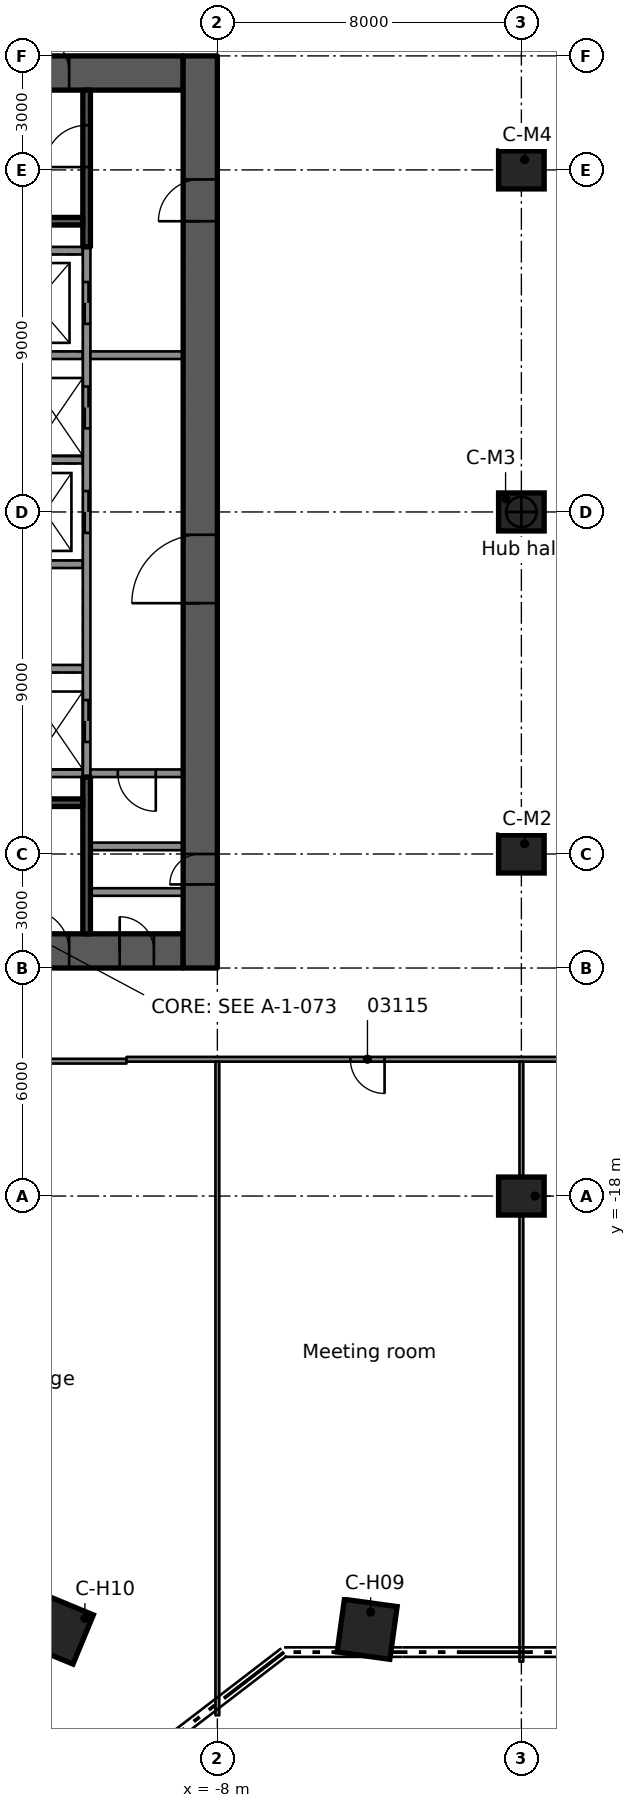
"""IFC4 building model, lengths in metres.
Left out: names, types, materials, properties, quantities, classifications, styles, units other than length and angle.
Written with IfcOpenShell. Run it as: python <this file> out.ifc"""

import sys

from ifc_helpers import new_model, si_unit, direction, frame, frame_2d, origin, origin_2d, place, context, subcontext, project, spatial, rectangle, extrude, element, fill, save


model = new_model("IFC4")
c1 = context("Model", 3, precision=1e-05, world=origin(), true_north=direction((0.0, 1.0)))
c2 = subcontext(c1, "Body", "Model", "MODEL_VIEW")
j1 = project(units=[si_unit("LENGTHUNIT", "METRE"), si_unit("PLANEANGLEUNIT", "RADIAN")], contexts=[c1])
p1 = place(None, origin())
s1 = spatial("IfcSite", under=j1, at=p1, CompositionType="ELEMENT")
p2 = place(p1, origin())
s2 = spatial("IfcBuilding", under=s1, at=p2, CompositionType="ELEMENT")
p3 = place(p2, frame((0.0, 0.0, 15.5)))
s3 = spatial("IfcBuildingStorey", under=s2, at=p3, CompositionType="ELEMENT", Elevation=15.5)
p4 = place(p3, frame((-18.1, 11.55, 0.0), z_axis=(0.0, 0.0, 1.0), x_axis=(1.0, 0.0, 0.0)))
e1 = element("IfcWall", 1, at=p4, inside=s3, PredefinedType="SHEAR", context=c2, shape_type="SweptSolid", body=[
    extrude(rectangle(XDim=9.2, YDim=0.9, at=frame_2d((4.6, 0.0))), origin(), (0.0, 0.0, 1.0), 5.0),
])
p5 = place(p4, frame((5.1, 0.0, 0.0)))
e2 = element("IfcOpeningElement", 2, at=p5, cuts=e1, PredefinedType="OPENING", context=c2, shape_type="SweptSolid", body=[
    extrude(rectangle(XDim=1.1, YDim=2.1, at=frame_2d((0.55, 1.05))), frame((0.0, 0.46, 0.0), z_axis=(0.0, -1.0, 0.0), x_axis=(1.0, 0.0, 0.0)), (0.0, 0.0, 1.0), 0.92),
])
p6 = place(p3, frame((-18.1, -11.55, 0.0), z_axis=(0.0, 0.0, 1.0), x_axis=(1.0, 0.0, 0.0)))
e3 = element("IfcWall", 3, at=p6, inside=s3, PredefinedType="SHEAR", context=c2, shape_type="SweptSolid", body=[
    extrude(rectangle(XDim=9.2, YDim=0.9, at=frame_2d((4.6, 0.0))), origin(), (0.0, 0.0, 1.0), 5.0),
])
p7 = place(p6, frame((5.1, 0.0, 0.0)))
e4 = element("IfcOpeningElement", 4, at=p7, cuts=e3, PredefinedType="OPENING", context=c2, shape_type="SweptSolid", body=[
    extrude(rectangle(XDim=1.1, YDim=2.1, at=frame_2d((0.55, 1.05))), frame((0.0, 0.46, 0.0), z_axis=(0.0, -1.0, 0.0), x_axis=(1.0, 0.0, 0.0)), (0.0, 0.0, 1.0), 0.92),
])
p8 = place(p6, frame((7.53, 0.0, 0.0)))
e5 = element("IfcOpeningElement", 5, at=p8, cuts=e3, PredefinedType="OPENING", context=c2, shape_type="SweptSolid", body=[
    extrude(rectangle(XDim=0.9, YDim=2.1, at=frame_2d((0.45, 1.05))), frame((0.0, 0.46, 0.0), z_axis=(0.0, -1.0, 0.0), x_axis=(1.0, 0.0, 0.0)), (0.0, 0.0, 1.0), 0.92),
])
p9 = place(p3, frame((-8.45, -12.0, 0.0), z_axis=(0.0, 0.0, 1.0), x_axis=(0.0, 1.0, 0.0)))
e6 = element("IfcWall", 6, at=p9, inside=s3, PredefinedType="SHEAR", context=c2, shape_type="SweptSolid", body=[
    extrude(rectangle(XDim=24.0, YDim=0.9, at=frame_2d((12.0, 0.0))), origin(), (0.0, 0.0, 1.0), 5.0),
])
p10 = place(p9, frame((9.6, 0.0, 0.0)))
e7 = element("IfcOpeningElement", 7, at=p10, cuts=e6, PredefinedType="OPENING", context=c2, shape_type="SweptSolid", body=[
    extrude(rectangle(XDim=1.8, YDim=2.1, at=frame_2d((0.9, 1.05))), frame((0.0, 0.46, 0.0), z_axis=(0.0, -1.0, 0.0), x_axis=(1.0, 0.0, 0.0)), (0.0, 0.0, 1.0), 0.92),
])
p11 = place(p9, frame((19.65, 0.0, 0.0)))
e8 = element("IfcOpeningElement", 8, at=p11, cuts=e6, PredefinedType="OPENING", context=c2, shape_type="SweptSolid", body=[
    extrude(rectangle(XDim=1.1, YDim=2.1, at=frame_2d((0.55, 1.05))), frame((0.0, 0.46, 0.0), z_axis=(0.0, -1.0, 0.0), x_axis=(1.0, 0.0, 0.0)), (0.0, 0.0, 1.0), 0.92),
])
p12 = place(p9, frame((2.2, 0.0, 0.0)))
e9 = element("IfcOpeningElement", 9, at=p12, cuts=e6, PredefinedType="OPENING", context=c2, shape_type="SweptSolid", body=[
    extrude(rectangle(XDim=0.8, YDim=2.1, at=frame_2d((0.4, 1.05))), frame((0.0, 0.46, 0.0), z_axis=(0.0, -1.0, 0.0), x_axis=(1.0, 0.0, 0.0)), (0.0, 0.0, 1.0), 0.92),
])
for number, where, z_axis, x_axis in (
    (10, (-4.059, -29.4, 0.0), (0.0, 0.0, 1.0), (-0.137, -0.991, 0.0)),
    (11, (-12.178, -29.4, 0.0), (0.0, 0.0, 1.0), (-0.383, -0.924, 0.0)),
):
    element("IfcColumn", number, at=place(p3, frame(where, z_axis=z_axis, x_axis=x_axis)), inside=s3, PredefinedType="COLUMN", context=c2, shape_type="SweptSolid", body=[
        extrude(rectangle(XDim=1.4, YDim=1.4, at=origin_2d()), origin(), (0.0, 0.0, 1.0), 5.0),
    ])
for number, where, z_axis, x_axis in (
    (12, (0.0, -18.0, 0.0), (0.0, 0.0, 1.0), (1.0, 0.0, 0.0)),
    (13, (0.0, -9.0, 0.0), (0.0, 0.0, 1.0), (1.0, 0.0, 0.0)),
    (14, (0.0, 0.0, 0.0), (0.0, 0.0, 1.0), (1.0, 0.0, 0.0)),
    (15, (0.0, 9.0, 0.0), (0.0, 0.0, 1.0), (1.0, 0.0, 0.0)),
):
    element("IfcColumn", number, at=place(p3, frame(where, z_axis=z_axis, x_axis=x_axis)), inside=s3, PredefinedType="COLUMN", context=c2, shape_type="SweptSolid", body=[
        extrude(rectangle(XDim=1.2, YDim=1.0, at=origin_2d()), origin(), (0.0, 0.0, 1.0), 5.0),
    ])
for number, where, z_axis, x_axis in (
    (16, (-11.54, 6.875, 0.0), (0.0, 0.0, 1.0), (-1.0, 0.0, 0.0)),
    (17, (-11.54, -6.875, 0.0), (0.0, 0.0, 1.0), (-1.0, 0.0, 0.0)),
):
    element("IfcWall", number, at=place(p3, frame(where, z_axis=z_axis, x_axis=x_axis)), inside=s3, PredefinedType="SOLIDWALL", context=c2, shape_type="SweptSolid", body=[
        extrude(rectangle(XDim=6.56, YDim=0.2, at=frame_2d((3.28, 0.0))), origin(), (0.0, 0.0, 1.0), 4.59),
    ])
p13 = place(p3, frame((-11.54, -4.125, 0.0), z_axis=(0.0, 0.0, 1.0), x_axis=(-1.0, 0.0, 0.0)))
e18 = element("IfcWall", 18, at=p13, inside=s3, PredefinedType="SOLIDWALL", context=c2, shape_type="SweptSolid", body=[
    extrude(rectangle(XDim=4.7, YDim=0.2, at=frame_2d((2.35, 0.0))), origin(), (0.0, 0.0, 1.0), 4.59),
])
for number, where, z_axis, x_axis in (
    (19, (-11.54, -1.375, 0.0), (0.0, 0.0, 1.0), (-1.0, 0.0, 0.0)),
    (20, (-11.54, 1.375, 0.0), (0.0, 0.0, 1.0), (-1.0, 0.0, 0.0)),
):
    element("IfcWall", number, at=place(p3, frame(where, z_axis=z_axis, x_axis=x_axis)), inside=s3, PredefinedType="SOLIDWALL", context=c2, shape_type="SweptSolid", body=[
        extrude(rectangle(XDim=4.2, YDim=0.2, at=frame_2d((2.1, 0.0))), origin(), (0.0, 0.0, 1.0), 4.59),
    ])
p14 = place(p3, frame((-11.54, 4.125, 0.0), z_axis=(0.0, 0.0, 1.0), x_axis=(-1.0, 0.0, 0.0)))
e21 = element("IfcWall", 21, at=p14, inside=s3, PredefinedType="SOLIDWALL", context=c2, shape_type="SweptSolid", body=[
    extrude(rectangle(XDim=4.7, YDim=0.2, at=frame_2d((2.35, 0.0))), origin(), (0.0, 0.0, 1.0), 4.59),
])
p15 = place(p3, frame((-11.44, -6.975, 0.0), z_axis=(0.0, 0.0, 1.0), x_axis=(0.0, 1.0, 0.0)))
e22 = element("IfcWall", 22, at=p15, inside=s3, PredefinedType="SOLIDWALL", context=c2, shape_type="SweptSolid", body=[
    extrude(rectangle(XDim=13.95, YDim=0.2, at=frame_2d((6.975, 0.0))), origin(), (0.0, 0.0, 1.0), 4.59),
])
p16 = place(p15, frame((0.925, 0.0, 0.0)))
e23 = element("IfcOpeningElement", 23, at=p16, cuts=e22, PredefinedType="OPENING", context=c2, shape_type="SweptSolid", body=[
    extrude(rectangle(XDim=1.1, YDim=2.1, at=frame_2d((0.55, 1.05))), frame((0.0, 0.11, 0.0), z_axis=(0.0, -1.0, 0.0), x_axis=(1.0, 0.0, 0.0)), (0.0, 0.0, 1.0), 0.22),
])
p17 = place(p15, frame((6.425, 0.0, 0.0)))
e24 = element("IfcOpeningElement", 24, at=p17, cuts=e22, PredefinedType="OPENING", context=c2, shape_type="SweptSolid", body=[
    extrude(rectangle(XDim=1.1, YDim=2.1, at=frame_2d((0.55, 1.05))), frame((0.0, 0.11, 0.0), z_axis=(0.0, -1.0, 0.0), x_axis=(1.0, 0.0, 0.0)), (0.0, 0.0, 1.0), 0.22),
])
p18 = place(p15, frame((9.175, 0.0, 0.0)))
e25 = element("IfcOpeningElement", 25, at=p18, cuts=e22, PredefinedType="OPENING", context=c2, shape_type="SweptSolid", body=[
    extrude(rectangle(XDim=1.1, YDim=2.1, at=frame_2d((0.55, 1.05))), frame((0.0, 0.11, 0.0), z_axis=(0.0, -1.0, 0.0), x_axis=(1.0, 0.0, 0.0)), (0.0, 0.0, 1.0), 0.22),
])
p19 = place(p15, frame((11.925, 0.0, 0.0)))
e26 = element("IfcOpeningElement", 26, at=p19, cuts=e22, PredefinedType="OPENING", context=c2, shape_type="SweptSolid", body=[
    extrude(rectangle(XDim=1.1, YDim=2.1, at=frame_2d((0.55, 1.05))), frame((0.0, 0.11, 0.0), z_axis=(0.0, -1.0, 0.0), x_axis=(1.0, 0.0, 0.0)), (0.0, 0.0, 1.0), 0.22),
])
p20 = place(p3, frame((-11.44, 6.975, 0.0), z_axis=(0.0, 0.0, 1.0), x_axis=(0.0, 1.0, 0.0)))
e27 = element("IfcWall", 27, at=p20, inside=s3, PredefinedType="SOLIDWALL", context=c2, shape_type="SweptSolid", body=[
    extrude(rectangle(XDim=4.125, YDim=0.2, at=frame_2d((2.062, 0.0))), origin(), (0.0, 0.0, 1.0), 4.59),
])
p21 = place(p20, frame((2.1, 0.0, 0.0)))
e28 = element("IfcOpeningElement", 28, at=p21, cuts=e27, PredefinedType="OPENING", context=c2, shape_type="SweptSolid", body=[
    extrude(rectangle(XDim=1.1, YDim=2.1, at=frame_2d((0.55, 1.05))), frame((0.0, 0.11, 0.0), z_axis=(0.0, -1.0, 0.0), x_axis=(1.0, 0.0, 0.0)), (0.0, 0.0, 1.0), 0.22),
])
p22 = place(p3, frame((-11.54, 7.65, 0.0), z_axis=(0.0, 0.0, 1.0), x_axis=(-1.0, 0.0, 0.0)))
e29 = element("IfcWall", 29, at=p22, inside=s3, PredefinedType="SOLIDWALL", context=c2, shape_type="SweptSolid", body=[
    extrude(rectangle(XDim=6.56, YDim=0.2, at=frame_2d((3.28, 0.0))), origin(), (0.0, 0.0, 1.0), 4.59),
])
p23 = place(p3, frame((-11.44, -11.1, 0.0), z_axis=(0.0, 0.0, 1.0), x_axis=(0.0, 1.0, 0.0)))
e30 = element("IfcWall", 30, at=p23, inside=s3, PredefinedType="SOLIDWALL", context=c2, shape_type="SweptSolid", body=[
    extrude(rectangle(XDim=4.125, YDim=0.2, at=frame_2d((2.062, 0.0))), origin(), (0.0, 0.0, 1.0), 4.59),
])
p24 = place(p3, frame((-11.54, -7.65, 0.0), z_axis=(0.0, 0.0, 1.0), x_axis=(-1.0, 0.0, 0.0)))
e31 = element("IfcWall", 31, at=p24, inside=s3, PredefinedType="SOLIDWALL", context=c2, shape_type="SweptSolid", body=[
    extrude(rectangle(XDim=6.56, YDim=0.2, at=frame_2d((3.28, 0.0))), origin(), (0.0, 0.0, 1.0), 4.59),
])
p25 = place(p3, frame((-8.9, 4.125, 0.0), z_axis=(0.0, 0.0, 1.0), x_axis=(-1.0, 0.0, 0.0)))
e32 = element("IfcWall", 32, at=p25, inside=s3, PredefinedType="PARTITIONING", context=c2, shape_type="SweptSolid", body=[
    extrude(rectangle(XDim=2.44, YDim=0.2, at=frame_2d((1.22, 0.0))), origin(), (0.0, 0.0, 1.0), 4.59),
])
p26 = place(p3, frame((-8.9, -6.875, 0.0), z_axis=(0.0, 0.0, 1.0), x_axis=(-1.0, 0.0, 0.0)))
e33 = element("IfcWall", 33, at=p26, inside=s3, PredefinedType="PARTITIONING", context=c2, shape_type="SweptSolid", body=[
    extrude(rectangle(XDim=2.44, YDim=0.2, at=frame_2d((1.22, 0.0))), origin(), (0.0, 0.0, 1.0), 4.59),
])
p27 = place(p26, frame((0.72, 0.0, 0.0)))
e34 = element("IfcOpeningElement", 34, at=p27, cuts=e33, PredefinedType="OPENING", context=c2, shape_type="SweptSolid", body=[
    extrude(rectangle(XDim=1.0, YDim=2.1, at=frame_2d((0.5, 1.05))), frame((0.0, 0.11, 0.0), z_axis=(0.0, -1.0, 0.0), x_axis=(1.0, 0.0, 0.0)), (0.0, 0.0, 1.0), 0.22),
])
for number, where, z_axis, x_axis in (
    (35, (-8.9, -10.0, 0.0), (0.0, 0.0, 1.0), (-1.0, 0.0, 0.0)),
    (36, (-8.9, -8.8, 0.0), (0.0, 0.0, 1.0), (-1.0, 0.0, 0.0)),
):
    element("IfcWall", number, at=place(p3, frame(where, z_axis=z_axis, x_axis=x_axis)), inside=s3, PredefinedType="PARTITIONING", context=c2, shape_type="SweptSolid", body=[
        extrude(rectangle(XDim=2.44, YDim=0.2, at=frame_2d((1.22, 0.0))), origin(), (0.0, 0.0, 1.0), 4.59),
    ])
p28 = place(p3, frame((-20.63, -23.535, 0.0), z_axis=(0.0, 0.0, 1.0), x_axis=(0.608785675767, -0.79333473451, 0.0)))
e37 = element("IfcWall", 37, at=p28, inside=s3, PredefinedType="PARTITIONING", context=c2, shape_type="SweptSolid", body=[
    extrude(rectangle(XDim=14.138, YDim=0.1, at=frame_2d((7.069, 0.0))), origin(), (0.0, 0.0, 1.0), 4.58),
])
p29 = place(p3, frame((-10.391, -14.451, 0.0), z_axis=(0.0, 0.0, 1.0), x_axis=(-1.0, 0.0, 0.0)))
e38 = element("IfcWall", 38, at=p29, inside=s3, PredefinedType="PARTITIONING", context=c2, shape_type="SweptSolid", body=[
    extrude(rectangle(XDim=7.871, YDim=0.125, at=frame_2d((3.936, 0.0))), origin(), (0.0, 0.0, 1.0), 4.58),
])
p30 = place(p29, frame((3.1, 0.0, 0.0)))
e39 = element("IfcOpeningElement", 39, at=p30, cuts=e38, PredefinedType="OPENING", context=c2, shape_type="SweptSolid", body=[
    extrude(rectangle(XDim=1.8, YDim=2.1, at=frame_2d((0.9, 1.05))), frame((0.0, 0.073, 0.0), z_axis=(0.0, -1.0, 0.0), x_axis=(1.0, 0.0, 0.0)), (0.0, 0.0, 1.0), 0.145),
])
p31 = place(p3, frame((10.391, -14.401, 0.0), z_axis=(0.0, 0.0, 1.0), x_axis=(-1.0, 0.0, 0.0)))
e40 = element("IfcWall", 40, at=p31, inside=s3, PredefinedType="PARTITIONING", context=c2, shape_type="SweptSolid", body=[
    extrude(rectangle(XDim=20.781, YDim=0.125, at=frame_2d((10.391, 0.0))), origin(), (0.0, 0.0, 1.0), 4.58),
])
p32 = place(p31, frame((13.991, 0.0, 0.0)))
e41 = element("IfcOpeningElement", 41, at=p32, cuts=e40, PredefinedType="OPENING", context=c2, shape_type="SweptSolid", body=[
    extrude(rectangle(XDim=0.9, YDim=2.1, at=frame_2d((0.45, 1.05))), frame((0.0, 0.073, 0.0), z_axis=(0.0, -1.0, 0.0), x_axis=(1.0, 0.0, 0.0)), (0.0, 0.0, 1.0), 0.145),
])
p33 = place(p31, frame((5.991, 0.0, 0.0)))
e42 = element("IfcOpeningElement", 42, at=p33, cuts=e40, PredefinedType="OPENING", context=c2, shape_type="SweptSolid", body=[
    extrude(rectangle(XDim=0.9, YDim=2.1, at=frame_2d((0.45, 1.05))), frame((0.0, 0.073, 0.0), z_axis=(0.0, -1.0, 0.0), x_axis=(1.0, 0.0, 0.0)), (0.0, 0.0, 1.0), 0.145),
])
p34 = place(p3, frame((0.0, -30.25, 0.0), z_axis=(0.0, 0.0, 1.0), x_axis=(0.0, 1.0, 0.0)))
e43 = element("IfcWall", 43, at=p34, inside=s3, PredefinedType="PARTITIONING", context=c2, shape_type="SweptSolid", body=[
    extrude(rectangle(XDim=15.787, YDim=0.1, at=frame_2d((7.894, 0.0))), origin(), (0.0, 0.0, 1.0), 4.58),
])
p35 = place(p3, frame((-8.0, -31.663, 0.0), z_axis=(0.0, 0.0, 1.0), x_axis=(0.0, 1.0, 0.0)))
e44 = element("IfcWall", 44, at=p35, inside=s3, PredefinedType="PARTITIONING", context=c2, shape_type="SweptSolid", body=[
    extrude(rectangle(XDim=17.2, YDim=0.1, at=frame_2d((8.6, 0.0))), origin(), (0.0, 0.0, 1.0), 4.58),
])
p36 = place(p16, origin())
e45 = element("IfcDoor", 45, at=p36, inside=s3, OperationType="DOUBLE_DOOR_SLIDING", PredefinedType="DOOR", context=c2, shape_type="SweptSolid", body=[
    extrude(rectangle(XDim=1.1, YDim=2.1, at=frame_2d((0.55, 1.05))), frame((0.0, 0.025, 0.0), z_axis=(0.0, -1.0, 0.0), x_axis=(1.0, 0.0, 0.0)), (0.0, 0.0, 1.0), 0.05),
])
fill(e23, e45)
p37 = place(p17, origin())
e46 = element("IfcDoor", 46, at=p37, inside=s3, OperationType="DOUBLE_DOOR_SLIDING", PredefinedType="DOOR", context=c2, shape_type="SweptSolid", body=[
    extrude(rectangle(XDim=1.1, YDim=2.1, at=frame_2d((0.55, 1.05))), frame((0.0, 0.025, 0.0), z_axis=(0.0, -1.0, 0.0), x_axis=(1.0, 0.0, 0.0)), (0.0, 0.0, 1.0), 0.05),
])
fill(e24, e46)
p38 = place(p18, origin())
e47 = element("IfcDoor", 47, at=p38, inside=s3, OperationType="DOUBLE_DOOR_SLIDING", PredefinedType="DOOR", context=c2, shape_type="SweptSolid", body=[
    extrude(rectangle(XDim=1.1, YDim=2.1, at=frame_2d((0.55, 1.05))), frame((0.0, 0.025, 0.0), z_axis=(0.0, -1.0, 0.0), x_axis=(1.0, 0.0, 0.0)), (0.0, 0.0, 1.0), 0.05),
])
fill(e25, e47)
p39 = place(p19, origin())
e48 = element("IfcDoor", 48, at=p39, inside=s3, OperationType="DOUBLE_DOOR_SLIDING", PredefinedType="DOOR", context=c2, shape_type="SweptSolid", body=[
    extrude(rectangle(XDim=1.1, YDim=2.1, at=frame_2d((0.55, 1.05))), frame((0.0, 0.025, 0.0), z_axis=(0.0, -1.0, 0.0), x_axis=(1.0, 0.0, 0.0)), (0.0, 0.0, 1.0), 0.05),
])
fill(e26, e48)
p40 = place(p10, origin())
e49 = element("IfcDoor", 49, at=p40, inside=s3, OperationType="SINGLE_SWING_LEFT", PredefinedType="DOOR", context=c2, shape_type="SweptSolid", body=[
    extrude(rectangle(XDim=1.8, YDim=2.1, at=frame_2d((0.9, 1.05))), frame((0.0, 0.025, 0.0), z_axis=(0.0, -1.0, 0.0), x_axis=(1.0, 0.0, 0.0)), (0.0, 0.0, 1.0), 0.05),
])
fill(e7, e49)
p41 = place(p11, origin())
e50 = element("IfcDoor", 50, at=p41, inside=s3, OperationType="SINGLE_SWING_RIGHT", PredefinedType="DOOR", context=c2, shape_type="SweptSolid", body=[
    extrude(rectangle(XDim=1.1, YDim=2.1, at=frame_2d((0.55, 1.05))), frame((0.0, 0.025, 0.0), z_axis=(0.0, -1.0, 0.0), x_axis=(1.0, 0.0, 0.0)), (0.0, 0.0, 1.0), 0.05),
])
fill(e8, e50)
p42 = place(p5, origin())
e51 = element("IfcDoor", 51, at=p42, inside=s3, OperationType="SINGLE_SWING_RIGHT", PredefinedType="DOOR", context=c2, shape_type="SweptSolid", body=[
    extrude(rectangle(XDim=1.1, YDim=2.1, at=frame_2d((0.55, 1.05))), frame((0.0, 0.025, 0.0), z_axis=(0.0, -1.0, 0.0), x_axis=(1.0, 0.0, 0.0)), (0.0, 0.0, 1.0), 0.05),
])
fill(e2, e51)
p43 = place(p7, origin())
e52 = element("IfcDoor", 52, at=p43, inside=s3, OperationType="SINGLE_SWING_RIGHT", PredefinedType="DOOR", context=c2, shape_type="SweptSolid", body=[
    extrude(rectangle(XDim=1.1, YDim=2.1, at=frame_2d((0.55, 1.05))), frame((0.0, 0.025, 0.0), z_axis=(0.0, -1.0, 0.0), x_axis=(1.0, 0.0, 0.0)), (0.0, 0.0, 1.0), 0.05),
])
fill(e4, e52)
p44 = place(p21, origin())
e53 = element("IfcDoor", 53, at=p44, inside=s3, OperationType="SINGLE_SWING_RIGHT", PredefinedType="DOOR", context=c2, shape_type="SweptSolid", body=[
    extrude(rectangle(XDim=1.1, YDim=2.1, at=frame_2d((0.55, 1.05))), frame((0.0, 0.025, 0.0), z_axis=(0.0, -1.0, 0.0), x_axis=(1.0, 0.0, 0.0)), (0.0, 0.0, 1.0), 0.05),
])
fill(e28, e53)
p45 = place(p8, origin())
e54 = element("IfcDoor", 54, at=p45, inside=s3, OperationType="SINGLE_SWING_RIGHT", PredefinedType="DOOR", context=c2, shape_type="SweptSolid", body=[
    extrude(rectangle(XDim=0.9, YDim=2.1, at=frame_2d((0.45, 1.05))), frame((0.0, 0.025, 0.0), z_axis=(0.0, -1.0, 0.0), x_axis=(1.0, 0.0, 0.0)), (0.0, 0.0, 1.0), 0.05),
])
fill(e5, e54)
p46 = place(p12, origin())
e55 = element("IfcDoor", 55, at=p46, inside=s3, OperationType="SINGLE_SWING_LEFT", PredefinedType="DOOR", context=c2, shape_type="SweptSolid", body=[
    extrude(rectangle(XDim=0.8, YDim=2.1, at=frame_2d((0.4, 1.05))), frame((0.0, 0.025, 0.0), z_axis=(0.0, -1.0, 0.0), x_axis=(1.0, 0.0, 0.0)), (0.0, 0.0, 1.0), 0.05),
])
fill(e9, e55)
p47 = place(p27, origin())
e56 = element("IfcDoor", 56, at=p47, inside=s3, OperationType="SINGLE_SWING_RIGHT", PredefinedType="DOOR", context=c2, shape_type="SweptSolid", body=[
    extrude(rectangle(XDim=1.0, YDim=2.1, at=frame_2d((0.5, 1.05))), frame((0.0, 0.025, 0.0), z_axis=(0.0, -1.0, 0.0), x_axis=(1.0, 0.0, 0.0)), (0.0, 0.0, 1.0), 0.05),
])
fill(e34, e56)
p48 = place(p32, origin())
e57 = element("IfcDoor", 57, at=p48, inside=s3, OperationType="SINGLE_SWING_RIGHT", PredefinedType="DOOR", context=c2, shape_type="SweptSolid", body=[
    extrude(rectangle(XDim=0.9, YDim=2.1, at=frame_2d((0.45, 1.05))), frame((0.0, 0.025, 0.0), z_axis=(0.0, -1.0, 0.0), x_axis=(1.0, 0.0, 0.0)), (0.0, 0.0, 1.0), 0.05),
])
fill(e41, e57)
save(model, sys.argv[1])
